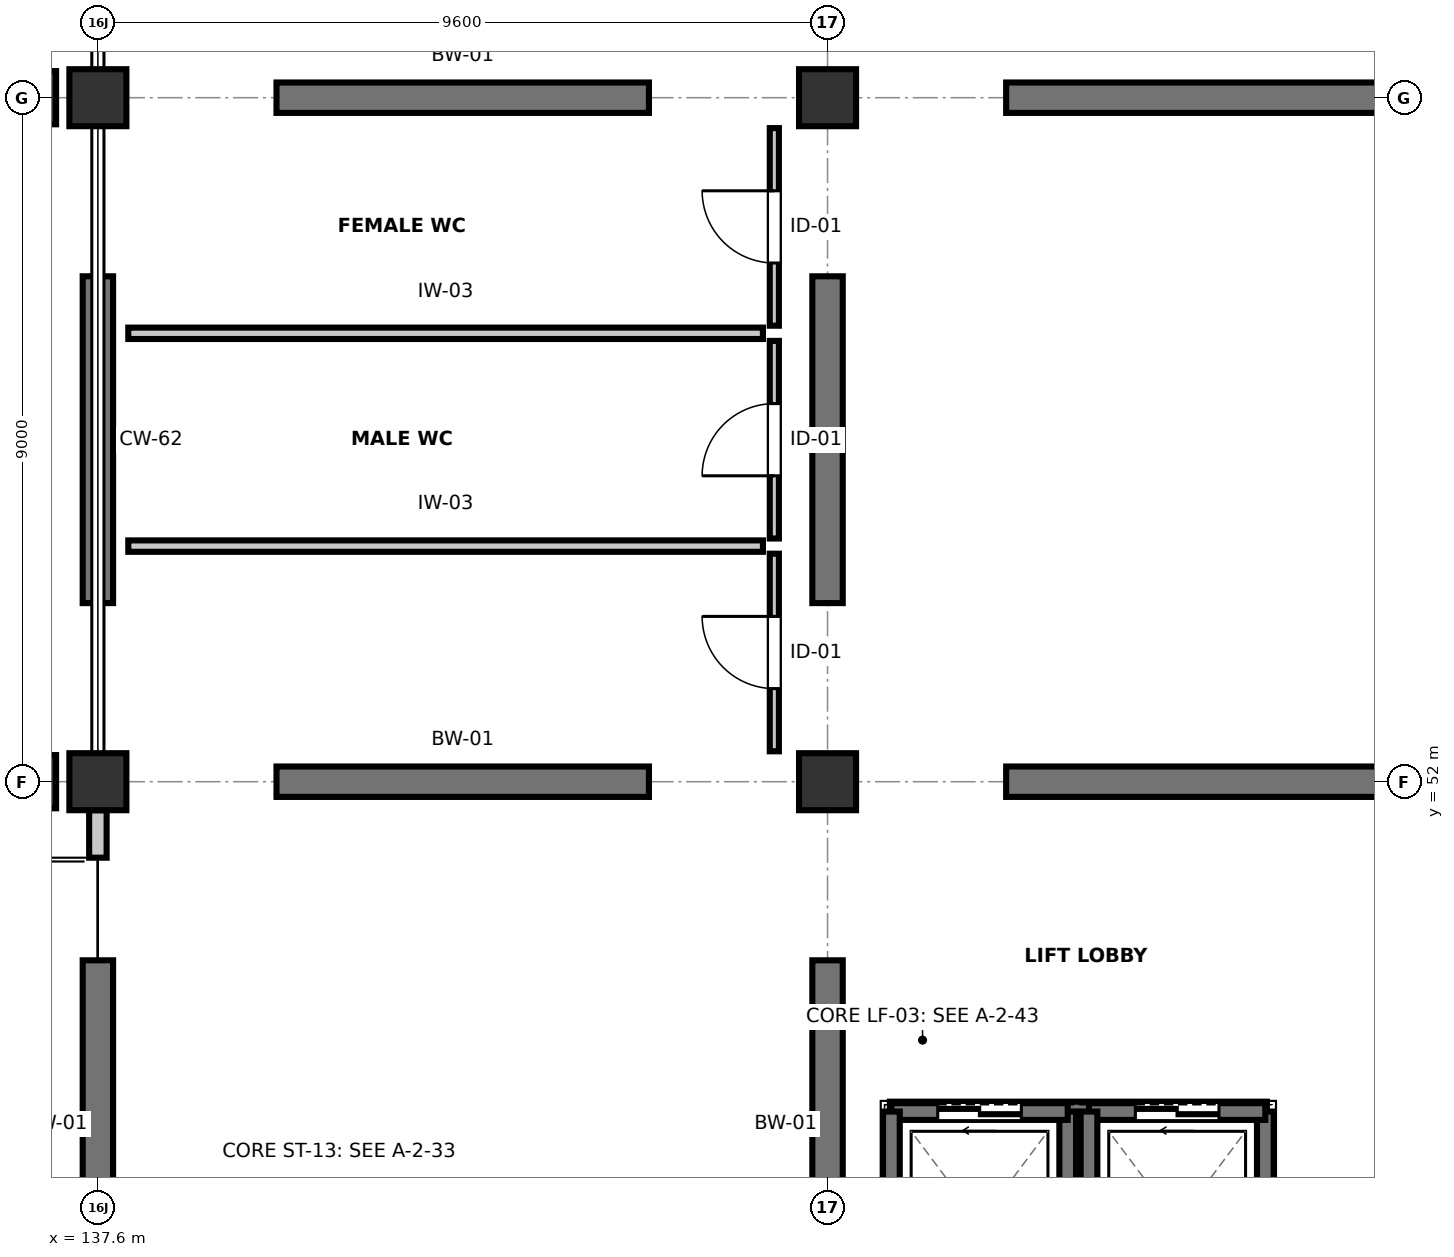
"""IFC4 building model, lengths in metres.
Left out: names, types, materials, properties, quantities, classifications, styles, units other than length and angle.
Written with IfcOpenShell. Run it as: python <this file> out.ifc"""

import sys

from ifc_helpers import new_model, si_unit, direction, frame, frame_2d, origin, origin_2d, place, context, subcontext, project, spatial, rectangle, extrude, element, fill, save


model = new_model("IFC4")
c1 = context("Model", 3, precision=1e-05, world=origin(), true_north=direction((0.0, 1.0)))
c2 = subcontext(c1, "Body", "Model", "MODEL_VIEW")
j1 = project(units=[si_unit("LENGTHUNIT", "METRE"), si_unit("PLANEANGLEUNIT", "RADIAN")], contexts=[c1])
p1 = place(None, origin())
s1 = spatial("IfcSite", under=j1, at=p1, CompositionType="ELEMENT")
p2 = place(p1, origin())
s2 = spatial("IfcBuilding", under=s1, at=p2, CompositionType="ELEMENT")
p3 = place(p2, frame((0.0, 0.0, 14.4)))
s3 = spatial("IfcBuildingStorey", under=s2, at=p3, CompositionType="ELEMENT", Elevation=14.4)
for number, where, z_axis, x_axis in (
    (1, (136.7, 52.0, 0.0), (0.0, 0.0, 1.0), (1.0, 0.0, 0.0)),
    (2, (136.7, 61.0, 0.0), (0.0, 0.0, 1.0), (1.0, 0.0, 0.0)),
):
    element("IfcColumn", number, at=place(p3, frame(where, z_axis=z_axis, x_axis=x_axis)), inside=s3, PredefinedType="COLUMN", context=c2, shape_type="SweptSolid", body=[
        extrude(rectangle(XDim=0.7, YDim=0.7, at=origin_2d()), origin(), (0.0, 0.0, 1.0), 4.8),
    ])
for number, where, z_axis, x_axis in (
    (3, (137.6, 52.0, 0.0), (0.0, 0.0, 1.0), (1.0, 0.0, 0.0)),
    (4, (137.6, 61.0, 0.0), (0.0, 0.0, 1.0), (1.0, 0.0, 0.0)),
    (5, (147.2, 52.0, 0.0), (0.0, 0.0, 1.0), (1.0, 0.0, 0.0)),
    (6, (147.2, 61.0, 0.0), (0.0, 0.0, 1.0), (1.0, 0.0, 0.0)),
):
    element("IfcColumn", number, at=place(p3, frame(where, z_axis=z_axis, x_axis=x_axis)), inside=s3, PredefinedType="COLUMN", context=c2, shape_type="SweptSolid", body=[
        extrude(rectangle(XDim=0.75, YDim=0.75, at=origin_2d()), origin(), (0.0, 0.0, 1.0), 4.8),
    ])
p4 = place(p3, frame((139.95, 52.0, -2.1), z_axis=(0.0, 0.0, 1.0), x_axis=(1.0, 0.0, 0.0)))
e7 = element("IfcWall", 7, at=p4, inside=s3, PredefinedType="SOLIDWALL", context=c2, shape_type="SweptSolid", body=[
    extrude(rectangle(XDim=4.9, YDim=0.4, at=frame_2d((2.45, 0.0))), origin(), (0.0, 0.0, 1.0), 1.85),
])
p5 = place(p3, frame((149.55, 52.0, -2.1), z_axis=(0.0, 0.0, 1.0), x_axis=(1.0, 0.0, 0.0)))
e8 = element("IfcWall", 8, at=p5, inside=s3, PredefinedType="SOLIDWALL", context=c2, shape_type="SweptSolid", body=[
    extrude(rectangle(XDim=4.9, YDim=0.4, at=frame_2d((2.45, 0.0))), origin(), (0.0, 0.0, 1.0), 1.85),
])
p6 = place(p3, frame((139.95, 61.0, -2.1), z_axis=(0.0, 0.0, 1.0), x_axis=(1.0, 0.0, 0.0)))
e9 = element("IfcWall", 9, at=p6, inside=s3, PredefinedType="SOLIDWALL", context=c2, shape_type="SweptSolid", body=[
    extrude(rectangle(XDim=4.9, YDim=0.4, at=frame_2d((2.45, 0.0))), origin(), (0.0, 0.0, 1.0), 1.85),
])
p7 = place(p3, frame((149.55, 61.0, -2.1), z_axis=(0.0, 0.0, 1.0), x_axis=(1.0, 0.0, 0.0)))
e10 = element("IfcWall", 10, at=p7, inside=s3, PredefinedType="SOLIDWALL", context=c2, shape_type="SweptSolid", body=[
    extrude(rectangle(XDim=4.9, YDim=0.4, at=frame_2d((2.45, 0.0))), origin(), (0.0, 0.0, 1.0), 1.85),
])
for number, where, z_axis, x_axis in (
    (11, (137.6, 45.35, -2.1), (0.0, 0.0, 1.0), (0.0, 1.0, 0.0)),
    (12, (137.6, 54.35, -2.1), (0.0, 0.0, 1.0), (0.0, 1.0, 0.0)),
    (13, (147.2, 45.35, -2.1), (0.0, 0.0, 1.0), (0.0, 1.0, 0.0)),
    (14, (147.2, 54.35, -2.1), (0.0, 0.0, 1.0), (0.0, 1.0, 0.0)),
):
    element("IfcWall", number, at=place(p3, frame(where, z_axis=z_axis, x_axis=x_axis)), inside=s3, PredefinedType="SOLIDWALL", context=c2, shape_type="SweptSolid", body=[
        extrude(rectangle(XDim=4.3, YDim=0.4, at=frame_2d((2.15, 0.0))), origin(), (0.0, 0.0, 1.0), 1.85),
    ])
p8 = place(p3, frame((137.6, 51.0, 0.0), z_axis=(0.0, 0.0, 1.0), x_axis=(0.0, 1.0, 0.0)))
e15 = element("IfcWall", 15, at=p8, inside=s3, PredefinedType="STANDARD", context=c2, shape_type="SweptSolid", body=[
    extrude(rectangle(XDim=0.625, YDim=0.23, at=frame_2d((0.312, 0.0))), origin(), (0.0, 0.0, 1.0), 3.891),
])
p9 = place(p3, frame((148.02, 47.68, -1.4), z_axis=(0.0, 0.0, 1.0), x_axis=(1.0, 0.0, 0.0)))
e16 = element("IfcWall", 16, at=p9, inside=s3, PredefinedType="SHEAR", context=c2, shape_type="SweptSolid", body=[
    extrude(rectangle(XDim=4.96, YDim=0.22, at=frame_2d((2.48, 0.0))), origin(), (0.0, 0.0, 1.0), 1.12),
])
p10 = place(p3, frame((150.36, 44.74, 0.0), z_axis=(0.0, 0.0, 1.0), x_axis=(0.0, 1.0, 0.0)))
e17 = element("IfcWall", 17, at=p10, inside=s3, PredefinedType="SHEAR", context=c2, shape_type="SweptSolid", body=[
    extrude(rectangle(XDim=2.92, YDim=0.22, at=frame_2d((1.46, 0.0))), origin(), (0.0, 0.0, 1.0), 4.5),
])
p11 = place(p3, frame((150.36, 47.66, 0.0), z_axis=(0.0, 0.0, 1.0), x_axis=(-1.0, 0.0, 0.0)))
e18 = element("IfcWall", 18, at=p11, inside=s3, PredefinedType="SHEAR", context=c2, shape_type="SweptSolid", body=[
    extrude(rectangle(XDim=2.32, YDim=0.22, at=frame_2d((1.16, 0.0))), origin(), (0.0, 0.0, 1.0), 4.5),
])
p12 = place(p11, frame((0.61, 0.0, 0.0)))
e19 = element("IfcOpeningElement", 19, at=p12, cuts=e18, PredefinedType="OPENING", context=c2, shape_type="SweptSolid", body=[
    extrude(rectangle(XDim=1.1, YDim=2.15, at=frame_2d((0.55, 1.075))), frame((0.0, 0.12, 0.0), z_axis=(0.0, -1.0, 0.0), x_axis=(1.0, 0.0, 0.0)), (0.0, 0.0, 1.0), 0.24),
])
for number, where, z_axis, x_axis in (
    (20, (148.04, 47.66, 0.0), (0.0, 0.0, 1.0), (0.0, -1.0, 0.0)),
    (21, (152.96, 44.74, 0.0), (0.0, 0.0, 1.0), (0.0, 1.0, 0.0)),
):
    element("IfcWall", number, at=place(p3, frame(where, z_axis=z_axis, x_axis=x_axis)), inside=s3, PredefinedType="SHEAR", context=c2, shape_type="SweptSolid", body=[
        extrude(rectangle(XDim=2.92, YDim=0.22, at=frame_2d((1.46, 0.0))), origin(), (0.0, 0.0, 1.0), 4.5),
    ])
p13 = place(p3, frame((152.96, 47.66, 0.0), z_axis=(0.0, 0.0, 1.0), x_axis=(-1.0, 0.0, 0.0)))
e22 = element("IfcWall", 22, at=p13, inside=s3, PredefinedType="SHEAR", context=c2, shape_type="SweptSolid", body=[
    extrude(rectangle(XDim=2.32, YDim=0.22, at=frame_2d((1.16, 0.0))), origin(), (0.0, 0.0, 1.0), 4.5),
])
p14 = place(p13, frame((0.61, 0.0, 0.0)))
e23 = element("IfcOpeningElement", 23, at=p14, cuts=e22, PredefinedType="OPENING", context=c2, shape_type="SweptSolid", body=[
    extrude(rectangle(XDim=1.1, YDim=2.15, at=frame_2d((0.55, 1.075))), frame((0.0, 0.12, 0.0), z_axis=(0.0, -1.0, 0.0), x_axis=(1.0, 0.0, 0.0)), (0.0, 0.0, 1.0), 0.24),
])
p15 = place(p3, frame((150.64, 47.66, 0.0), z_axis=(0.0, 0.0, 1.0), x_axis=(0.0, -1.0, 0.0)))
e24 = element("IfcWall", 24, at=p15, inside=s3, PredefinedType="SHEAR", context=c2, shape_type="SweptSolid", body=[
    extrude(rectangle(XDim=2.92, YDim=0.22, at=frame_2d((1.46, 0.0))), origin(), (0.0, 0.0, 1.0), 4.5),
])
p16 = place(p3, frame((146.5, 52.4, 0.0), z_axis=(0.0, 0.0, 1.0), x_axis=(0.0, 1.0, 0.0)))
e25 = element("IfcWall", 25, at=p16, inside=s3, PredefinedType="PARTITIONING", context=c2, shape_type="SweptSolid", body=[
    extrude(rectangle(XDim=2.6, YDim=0.12, at=frame_2d((1.3, 0.0))), origin(), (0.0, 0.0, 1.0), 3.985),
])
p17 = place(p16, frame((0.825, 0.0, 0.0)))
e26 = element("IfcOpeningElement", 26, at=p17, cuts=e25, PredefinedType="OPENING", context=c2, shape_type="SweptSolid", body=[
    extrude(rectangle(XDim=0.95, YDim=2.12, at=frame_2d((0.475, 1.06))), frame((0.0, 0.07, 0.0), z_axis=(0.0, -1.0, 0.0), x_axis=(1.0, 0.0, 0.0)), (0.0, 0.0, 1.0), 0.14),
])
p18 = place(p3, frame((146.5, 55.2, 0.0), z_axis=(0.0, 0.0, 1.0), x_axis=(0.0, 1.0, 0.0)))
e27 = element("IfcWall", 27, at=p18, inside=s3, PredefinedType="PARTITIONING", context=c2, shape_type="SweptSolid", body=[
    extrude(rectangle(XDim=2.6, YDim=0.12, at=frame_2d((1.3, 0.0))), origin(), (0.0, 0.0, 1.0), 4.485),
])
p19 = place(p18, frame((0.825, 0.0, 0.0)))
e28 = element("IfcOpeningElement", 28, at=p19, cuts=e27, PredefinedType="OPENING", context=c2, shape_type="SweptSolid", body=[
    extrude(rectangle(XDim=0.95, YDim=2.12, at=frame_2d((0.475, 1.06))), frame((0.0, 0.07, 0.0), z_axis=(0.0, -1.0, 0.0), x_axis=(1.0, 0.0, 0.0)), (0.0, 0.0, 1.0), 0.14),
])
p20 = place(p3, frame((138.0, 55.1, 0.0), z_axis=(0.0, 0.0, 1.0), x_axis=(1.0, 0.0, 0.0)))
e29 = element("IfcWall", 29, at=p20, inside=s3, PredefinedType="PARTITIONING", context=c2, shape_type="SweptSolid", body=[
    extrude(rectangle(XDim=8.35, YDim=0.15, at=frame_2d((4.175, 0.0))), origin(), (0.0, 0.0, 1.0), 3.985),
])
p21 = place(p3, frame((146.5, 58.0, 0.0), z_axis=(0.0, 0.0, 1.0), x_axis=(0.0, 1.0, 0.0)))
e30 = element("IfcWall", 30, at=p21, inside=s3, PredefinedType="PARTITIONING", context=c2, shape_type="SweptSolid", body=[
    extrude(rectangle(XDim=2.6, YDim=0.12, at=frame_2d((1.3, 0.0))), origin(), (0.0, 0.0, 1.0), 3.985),
])
p22 = place(p21, frame((0.825, 0.0, 0.0)))
e31 = element("IfcOpeningElement", 31, at=p22, cuts=e30, PredefinedType="OPENING", context=c2, shape_type="SweptSolid", body=[
    extrude(rectangle(XDim=0.95, YDim=2.12, at=frame_2d((0.475, 1.06))), frame((0.0, 0.07, 0.0), z_axis=(0.0, -1.0, 0.0), x_axis=(1.0, 0.0, 0.0)), (0.0, 0.0, 1.0), 0.14),
])
p23 = place(p3, frame((138.0, 57.9, 0.0), z_axis=(0.0, 0.0, 1.0), x_axis=(1.0, 0.0, 0.0)))
e32 = element("IfcWall", 32, at=p23, inside=s3, PredefinedType="PARTITIONING", context=c2, shape_type="SweptSolid", body=[
    extrude(rectangle(XDim=8.35, YDim=0.15, at=frame_2d((4.175, 0.0))), origin(), (0.0, 0.0, 1.0), 3.985),
])
p24 = place(p12, origin())
e33 = element("IfcDoor", 33, at=p24, inside=s3, OperationType="DOUBLE_DOOR_SLIDING", PredefinedType="DOOR", context=c2, shape_type="SweptSolid", body=[
    extrude(rectangle(XDim=1.1, YDim=2.15, at=frame_2d((0.55, 1.075))), frame((0.0, 0.025, 0.0), z_axis=(0.0, -1.0, 0.0), x_axis=(1.0, 0.0, 0.0)), (0.0, 0.0, 1.0), 0.05),
])
fill(e19, e33)
p25 = place(p14, origin())
e34 = element("IfcDoor", 34, at=p25, inside=s3, OperationType="DOUBLE_DOOR_SLIDING", PredefinedType="DOOR", context=c2, shape_type="SweptSolid", body=[
    extrude(rectangle(XDim=1.1, YDim=2.15, at=frame_2d((0.55, 1.075))), frame((0.0, 0.025, 0.0), z_axis=(0.0, -1.0, 0.0), x_axis=(1.0, 0.0, 0.0)), (0.0, 0.0, 1.0), 0.05),
])
fill(e23, e34)
p26 = place(p17, origin())
e35 = element("IfcDoor", 35, at=p26, inside=s3, OperationType="SINGLE_SWING_RIGHT", PredefinedType="DOOR", context=c2, shape_type="SweptSolid", body=[
    extrude(rectangle(XDim=0.95, YDim=2.12, at=frame_2d((0.475, 1.06))), frame((0.0, 0.025, 0.0), z_axis=(0.0, -1.0, 0.0), x_axis=(1.0, 0.0, 0.0)), (0.0, 0.0, 1.0), 0.05),
])
fill(e26, e35)
p27 = place(p19, origin())
e36 = element("IfcDoor", 36, at=p27, inside=s3, OperationType="SINGLE_SWING_LEFT", PredefinedType="DOOR", context=c2, shape_type="SweptSolid", body=[
    extrude(rectangle(XDim=0.95, YDim=2.12, at=frame_2d((0.475, 1.06))), frame((0.0, 0.025, 0.0), z_axis=(0.0, -1.0, 0.0), x_axis=(1.0, 0.0, 0.0)), (0.0, 0.0, 1.0), 0.05),
])
fill(e28, e36)
p28 = place(p22, origin())
e37 = element("IfcDoor", 37, at=p28, inside=s3, OperationType="SINGLE_SWING_RIGHT", PredefinedType="DOOR", context=c2, shape_type="SweptSolid", body=[
    extrude(rectangle(XDim=0.95, YDim=2.12, at=frame_2d((0.475, 1.06))), frame((0.0, 0.025, 0.0), z_axis=(0.0, -1.0, 0.0), x_axis=(1.0, 0.0, 0.0)), (0.0, 0.0, 1.0), 0.05),
])
fill(e31, e37)
save(model, sys.argv[1])
